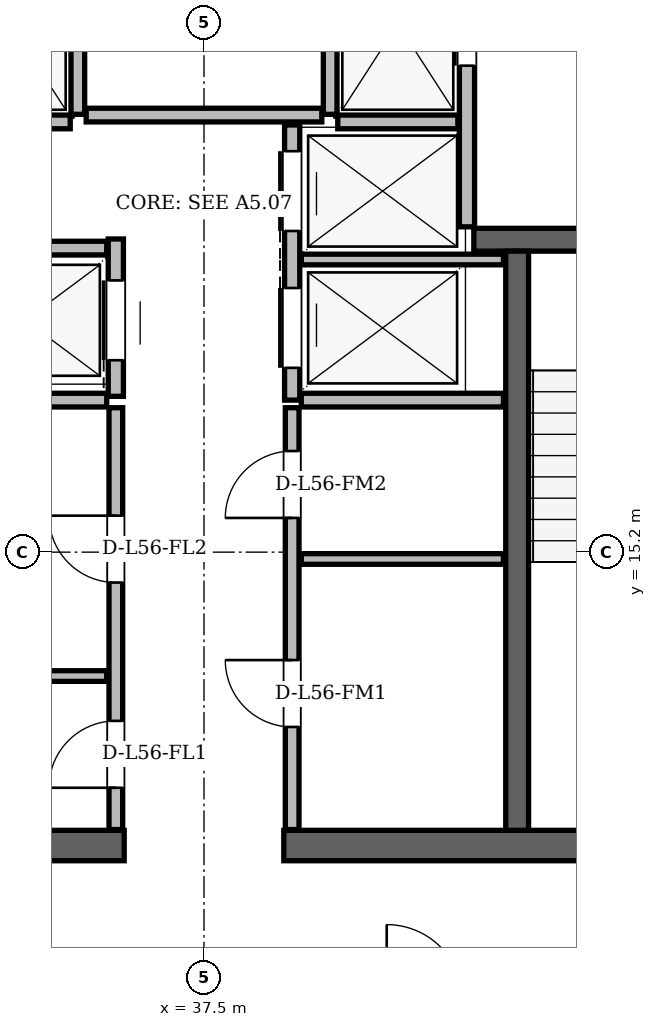
"""IFC4 building model, lengths in metres.
Left out: names, types, materials, properties, quantities, classifications, styles, units other than length and angle.
Written with IfcOpenShell. Run it as: python <this file> out.ifc"""

import sys

from ifc_helpers import new_model, si_unit, direction, frame, frame_2d, origin, place, context, subcontext, project, spatial, rectangle, extrude, element, fill, save


model = new_model("IFC4")
c1 = context("Model", 3, precision=1e-05, world=origin(), true_north=direction((0.0, 1.0)))
c2 = subcontext(c1, "Body", "Model", "MODEL_VIEW")
j1 = project(units=[si_unit("LENGTHUNIT", "METRE"), si_unit("PLANEANGLEUNIT", "RADIAN")], contexts=[c1])
p1 = place(None, origin())
s1 = spatial("IfcSite", under=j1, at=p1, CompositionType="ELEMENT")
p2 = place(p1, origin())
s2 = spatial("IfcBuilding", under=s1, at=p2, CompositionType="ELEMENT")
p3 = place(p2, frame((0.0, 0.0, 212.7)))
s3 = spatial("IfcBuildingStorey", under=s2, at=p3, CompositionType="ELEMENT", Elevation=212.7)
for number, where, z_axis, x_axis in (
    (1, (29.35, 11.34, 0.0), (0.0, 0.0, 1.0), (1.0, 0.0, 0.0)),
    (2, (38.55, 11.34, 0.0), (0.0, 0.0, 1.0), (1.0, 0.0, 0.0)),
):
    element("IfcWall", number, at=place(p3, frame(where, z_axis=z_axis, x_axis=x_axis)), inside=s3, PredefinedType="SHEAR", context=c2, shape_type="SweptSolid", body=[
        extrude(rectangle(XDim=7.1, YDim=0.4, at=frame_2d((3.55, 0.0))), origin(), (0.0, 0.0, 1.0), 3.38),
    ])
p4 = place(p3, frame((41.05, 19.31, 0.0), z_axis=(0.0, 0.0, 1.0), x_axis=(1.0, 0.0, 0.0)))
e3 = element("IfcWall", 3, at=p4, inside=s3, PredefinedType="SHEAR", context=c2, shape_type="SweptSolid", body=[
    extrude(rectangle(XDim=4.01, YDim=0.3, at=frame_2d((2.005, 0.0))), origin(), (0.0, 0.0, 1.0), 3.38),
])
p5 = place(p4, frame((1.6, 0.0, 0.0)))
e4 = element("IfcOpeningElement", 4, at=p5, cuts=e3, PredefinedType="OPENING", context=c2, shape_type="SweptSolid", body=[
    extrude(rectangle(XDim=1.4, YDim=2.2, at=frame_2d((0.7, 1.1))), frame((0.0, 0.15, 0.0), z_axis=(0.0, -1.0, 0.0), x_axis=(1.0, 0.0, 0.0)), (0.0, 0.0, 1.0), 0.3),
])
p6 = place(p3, frame((41.62, 11.54, 0.0), z_axis=(0.0, 0.0, 1.0), x_axis=(0.0, 1.0, 0.0)))
e5 = element("IfcWall", 5, at=p6, inside=s3, PredefinedType="SHEAR", context=c2, shape_type="SweptSolid", body=[
    extrude(rectangle(XDim=7.62, YDim=0.3, at=frame_2d((3.81, 0.0))), origin(), (0.0, 0.0, 1.0), 3.38),
])
p7 = place(p3, frame((59.201, 11.543, 0.0), z_axis=(0.0, 0.0, 1.0), x_axis=(-0.499999040053, 0.866025958009, 0.0)))
e6 = element("IfcWall", 6, at=p7, inside=s3, PredefinedType="SOLIDWALL", context=c2, shape_type="SweptSolid", body=[
    extrude(rectangle(XDim=36.523, YDim=0.29, at=frame_2d((18.261, 0.0))), origin(), (0.0, 0.0, 1.0), 2.677),
])
p8 = place(p7, frame((8.034, 0.0, 0.0)))
e7 = element("IfcOpeningElement", 7, at=p8, cuts=e6, PredefinedType="OPENING", context=c2, shape_type="SweptSolid", body=[
    extrude(rectangle(XDim=1.5, YDim=2.2, at=frame_2d((0.75, 1.1))), frame((0.0, 0.145, 0.0), z_axis=(0.0, -1.0, 0.0), x_axis=(1.0, 0.0, 0.0)), (0.0, 0.0, 1.0), 0.29),
])
p9 = place(p7, frame((31.594, 0.0, 0.0)))
e8 = element("IfcOpeningElement", 8, at=p9, cuts=e6, PredefinedType="OPENING", context=c2, shape_type="SweptSolid", body=[
    extrude(rectangle(XDim=1.5, YDim=2.2, at=frame_2d((0.75, 1.1))), frame((0.0, 0.145, 0.0), z_axis=(0.0, -1.0, 0.0), x_axis=(1.0, 0.0, 0.0)), (0.0, 0.0, 1.0), 0.29),
])
p10 = place(p7, frame((12.291, 0.0, 0.85)))
e9 = element("IfcOpeningElement", 9, at=p10, cuts=e6, PredefinedType="OPENING", context=c2, shape_type="SweptSolid", body=[
    extrude(rectangle(XDim=1.4, YDim=1.6, at=frame_2d((0.7, 0.8))), frame((0.0, 0.145, 0.0), z_axis=(0.0, -1.0, 0.0), x_axis=(1.0, 0.0, 0.0)), (0.0, 0.0, 1.0), 0.29),
])
p11 = place(p7, frame((2.252, 0.0, 0.85)))
e10 = element("IfcOpeningElement", 10, at=p11, cuts=e6, PredefinedType="OPENING", context=c2, shape_type="SweptSolid", body=[
    extrude(rectangle(XDim=1.2, YDim=1.48, at=frame_2d((0.6, 0.74))), frame((0.0, 0.145, 0.0), z_axis=(0.0, -1.0, 0.0), x_axis=(1.0, 0.0, 0.0)), (0.0, 0.0, 1.0), 0.29),
])
p12 = place(p7, frame((16.093, 0.0, 0.85)))
e11 = element("IfcOpeningElement", 11, at=p12, cuts=e6, PredefinedType="OPENING", context=c2, shape_type="SweptSolid", body=[
    extrude(rectangle(XDim=3.0, YDim=1.717, at=frame_2d((1.5, 0.858))), frame((0.0, 0.145, 0.0), z_axis=(0.0, -1.0, 0.0), x_axis=(1.0, 0.0, 0.0)), (0.0, 0.0, 1.0), 0.29),
])
p13 = place(p7, frame((23.458, 0.0, 0.85)))
e12 = element("IfcOpeningElement", 12, at=p13, cuts=e6, PredefinedType="OPENING", context=c2, shape_type="SweptSolid", body=[
    extrude(rectangle(XDim=1.2, YDim=1.48, at=frame_2d((0.6, 0.74))), frame((0.0, 0.145, 0.0), z_axis=(0.0, -1.0, 0.0), x_axis=(1.0, 0.0, 0.0)), (0.0, 0.0, 1.0), 0.29),
])
p14 = place(p7, frame((34.061, 0.0, 0.85)))
e13 = element("IfcOpeningElement", 13, at=p14, cuts=e6, PredefinedType="OPENING", context=c2, shape_type="SweptSolid", body=[
    extrude(rectangle(XDim=1.2, YDim=1.48, at=frame_2d((0.6, 0.74))), frame((0.0, 0.145, 0.0), z_axis=(0.0, -1.0, 0.0), x_axis=(1.0, 0.0, 0.0)), (0.0, 0.0, 1.0), 0.29),
])
p15 = place(p3, frame((35.84, 20.96, 0.0), z_axis=(0.0, 0.0, 1.0), x_axis=(0.0, 1.0, 0.0)))
e14 = element("IfcWall", 14, at=p15, inside=s3, PredefinedType="PARTITIONING", context=c2, shape_type="SweptSolid", body=[
    extrude(rectangle(XDim=3.02, YDim=0.18, at=frame_2d((1.51, 0.0))), origin(), (0.0, 0.0, 1.0), 3.38),
])
p16 = place(p3, frame((34.16, 20.86, 0.0), z_axis=(0.0, 0.0, 1.0), x_axis=(1.0, 0.0, 0.0)))
e15 = element("IfcWall", 15, at=p16, inside=s3, PredefinedType="PARTITIONING", context=c2, shape_type="SweptSolid", body=[
    extrude(rectangle(XDim=1.58, YDim=0.18, at=frame_2d((0.79, 0.0))), origin(), (0.0, 0.0, 1.0), 3.38),
])
p17 = place(p3, frame((40.96, 19.48, 0.0), z_axis=(0.0, 0.0, 1.0), x_axis=(0.0, 1.0, 0.0)))
e16 = element("IfcWall", 16, at=p17, inside=s3, PredefinedType="PARTITIONING", context=c2, shape_type="SweptSolid", body=[
    extrude(rectangle(XDim=4.5, YDim=0.2, at=frame_2d((2.25, 0.0))), origin(), (0.0, 0.0, 1.0), 3.38),
])
p18 = place(p17, frame((2.12, 0.0, 0.0)))
e17 = element("IfcOpeningElement", 17, at=p18, cuts=e16, PredefinedType="OPENING", context=c2, shape_type="SweptSolid", body=[
    extrude(rectangle(XDim=1.1, YDim=2.2, at=frame_2d((0.55, 1.1))), frame((0.0, 0.1, 0.0), z_axis=(0.0, -1.0, 0.0), x_axis=(1.0, 0.0, 0.0)), (0.0, 0.0, 1.0), 0.2),
])
p19 = place(p3, frame((39.16, 20.96, 0.0), z_axis=(0.0, 0.0, 1.0), x_axis=(0.0, 1.0, 0.0)))
e18 = element("IfcWall", 18, at=p19, inside=s3, PredefinedType="PARTITIONING", context=c2, shape_type="SweptSolid", body=[
    extrude(rectangle(XDim=3.02, YDim=0.18, at=frame_2d((1.51, 0.0))), origin(), (0.0, 0.0, 1.0), 3.38),
])
p20 = place(p3, frame((39.26, 20.86, 0.0), z_axis=(0.0, 0.0, 1.0), x_axis=(1.0, 0.0, 0.0)))
e19 = element("IfcWall", 19, at=p20, inside=s3, PredefinedType="PARTITIONING", context=c2, shape_type="SweptSolid", body=[
    extrude(rectangle(XDim=1.58, YDim=0.18, at=frame_2d((0.79, 0.0))), origin(), (0.0, 0.0, 1.0), 3.38),
])
p21 = place(p3, frame((36.34, 17.25, 0.0), z_axis=(0.0, 0.0, 1.0), x_axis=(0.0, 1.0, 0.0)))
e20 = element("IfcWall", 20, at=p21, inside=s3, PredefinedType="PARTITIONING", context=c2, shape_type="SweptSolid", body=[
    extrude(rectangle(XDim=2.07, YDim=0.2, at=frame_2d((1.035, 0.0))), origin(), (0.0, 0.0, 1.0), 3.38),
])
p22 = place(p21, frame((0.475, 0.0, 0.0)))
e21 = element("IfcOpeningElement", 21, at=p22, cuts=e20, PredefinedType="OPENING", context=c2, shape_type="SweptSolid", body=[
    extrude(rectangle(XDim=1.05, YDim=2.15, at=frame_2d((0.525, 1.075))), frame((0.0, 0.1, 0.0), z_axis=(0.0, -1.0, 0.0), x_axis=(1.0, 0.0, 0.0)), (0.0, 0.0, 1.0), 0.2),
])
p23 = place(p3, frame((33.95, 19.2, 0.0), z_axis=(0.0, 0.0, 1.0), x_axis=(1.0, 0.0, 0.0)))
e22 = element("IfcWall", 22, at=p23, inside=s3, PredefinedType="PARTITIONING", context=c2, shape_type="SweptSolid", body=[
    extrude(rectangle(XDim=2.27, YDim=0.18, at=frame_2d((1.135, 0.0))), origin(), (0.0, 0.0, 1.0), 3.38),
])
p24 = place(p3, frame((33.56, 17.2, 0.0), z_axis=(0.0, 0.0, 1.0), x_axis=(1.0, 0.0, 0.0)))
e23 = element("IfcWall", 23, at=p24, inside=s3, PredefinedType="PARTITIONING", context=c2, shape_type="SweptSolid", body=[
    extrude(rectangle(XDim=2.66, YDim=0.18, at=frame_2d((1.33, 0.0))), origin(), (0.0, 0.0, 1.0), 3.38),
])
p25 = place(p3, frame((36.34, 11.55, 0.0), z_axis=(0.0, 0.0, 1.0), x_axis=(0.0, 1.0, 0.0)))
e24 = element("IfcWall", 24, at=p25, inside=s3, PredefinedType="PARTITIONING", context=c2, shape_type="SweptSolid", body=[
    extrude(rectangle(XDim=5.55, YDim=0.18, at=frame_2d((2.775, 0.0))), origin(), (0.0, 0.0, 1.0), 3.38),
])
p26 = place(p25, frame((0.55, 0.0, 0.0)))
e25 = element("IfcOpeningElement", 25, at=p26, cuts=e24, PredefinedType="OPENING", context=c2, shape_type="SweptSolid", body=[
    extrude(rectangle(XDim=0.88, YDim=2.08, at=frame_2d((0.44, 1.04))), frame((0.0, 0.09, 0.0), z_axis=(0.0, -1.0, 0.0), x_axis=(1.0, 0.0, 0.0)), (0.0, 0.0, 1.0), 0.18),
])
p27 = place(p25, frame((3.25, 0.0, 0.0)))
e26 = element("IfcOpeningElement", 26, at=p27, cuts=e24, PredefinedType="OPENING", context=c2, shape_type="SweptSolid", body=[
    extrude(rectangle(XDim=0.88, YDim=2.08, at=frame_2d((0.44, 1.04))), frame((0.0, 0.09, 0.0), z_axis=(0.0, -1.0, 0.0), x_axis=(1.0, 0.0, 0.0)), (0.0, 0.0, 1.0), 0.18),
])
p28 = place(p3, frame((33.56, 13.57, 0.0), z_axis=(0.0, 0.0, 1.0), x_axis=(1.0, 0.0, 0.0)))
e27 = element("IfcWall", 27, at=p28, inside=s3, PredefinedType="PARTITIONING", context=c2, shape_type="SweptSolid", body=[
    extrude(rectangle(XDim=2.66, YDim=0.14, at=frame_2d((1.33, 0.0))), origin(), (0.0, 0.0, 1.0), 3.38),
])
p29 = place(p3, frame((38.66, 17.2, 0.0), z_axis=(0.0, 0.0, 1.0), x_axis=(0.0, 1.0, 0.0)))
e28 = element("IfcWall", 28, at=p29, inside=s3, PredefinedType="PARTITIONING", context=c2, shape_type="SweptSolid", body=[
    extrude(rectangle(XDim=3.62, YDim=0.2, at=frame_2d((1.81, 0.0))), origin(), (0.0, 0.0, 1.0), 3.38),
])
p30 = place(p29, frame((0.425, 0.0, 0.0)))
e29 = element("IfcOpeningElement", 29, at=p30, cuts=e28, PredefinedType="OPENING", context=c2, shape_type="SweptSolid", body=[
    extrude(rectangle(XDim=1.05, YDim=2.15, at=frame_2d((0.525, 1.075))), frame((0.0, 0.1, 0.0), z_axis=(0.0, -1.0, 0.0), x_axis=(1.0, 0.0, 0.0)), (0.0, 0.0, 1.0), 0.2),
])
p31 = place(p29, frame((2.225, 0.0, 0.0)))
e30 = element("IfcOpeningElement", 30, at=p31, cuts=e28, PredefinedType="OPENING", context=c2, shape_type="SweptSolid", body=[
    extrude(rectangle(XDim=1.05, YDim=2.15, at=frame_2d((0.525, 1.075))), frame((0.0, 0.1, 0.0), z_axis=(0.0, -1.0, 0.0), x_axis=(1.0, 0.0, 0.0)), (0.0, 0.0, 1.0), 0.2),
])
p32 = place(p3, frame((38.78, 17.2, 0.0), z_axis=(0.0, 0.0, 1.0), x_axis=(1.0, 0.0, 0.0)))
e31 = element("IfcWall", 31, at=p32, inside=s3, PredefinedType="PARTITIONING", context=c2, shape_type="SweptSolid", body=[
    extrude(rectangle(XDim=2.66, YDim=0.18, at=frame_2d((1.33, 0.0))), origin(), (0.0, 0.0, 1.0), 3.38),
])
p33 = place(p3, frame((38.78, 19.05, 0.0), z_axis=(0.0, 0.0, 1.0), x_axis=(1.0, 0.0, 0.0)))
e32 = element("IfcWall", 32, at=p33, inside=s3, PredefinedType="PARTITIONING", context=c2, shape_type="SweptSolid", body=[
    extrude(rectangle(XDim=2.66, YDim=0.14, at=frame_2d((1.33, 0.0))), origin(), (0.0, 0.0, 1.0), 3.38),
])
p34 = place(p3, frame((38.66, 11.55, 0.0), z_axis=(0.0, 0.0, 1.0), x_axis=(0.0, 1.0, 0.0)))
e33 = element("IfcWall", 33, at=p34, inside=s3, PredefinedType="PARTITIONING", context=c2, shape_type="SweptSolid", body=[
    extrude(rectangle(XDim=5.55, YDim=0.18, at=frame_2d((2.775, 0.0))), origin(), (0.0, 0.0, 1.0), 3.38),
])
p35 = place(p34, frame((1.35, 0.0, 0.0)))
e34 = element("IfcOpeningElement", 34, at=p35, cuts=e33, PredefinedType="OPENING", context=c2, shape_type="SweptSolid", body=[
    extrude(rectangle(XDim=0.88, YDim=2.08, at=frame_2d((0.44, 1.04))), frame((0.0, 0.09, 0.0), z_axis=(0.0, -1.0, 0.0), x_axis=(1.0, 0.0, 0.0)), (0.0, 0.0, 1.0), 0.18),
])
p36 = place(p34, frame((4.1, 0.0, 0.0)))
e35 = element("IfcOpeningElement", 35, at=p36, cuts=e33, PredefinedType="OPENING", context=c2, shape_type="SweptSolid", body=[
    extrude(rectangle(XDim=0.88, YDim=2.08, at=frame_2d((0.44, 1.04))), frame((0.0, 0.09, 0.0), z_axis=(0.0, -1.0, 0.0), x_axis=(1.0, 0.0, 0.0)), (0.0, 0.0, 1.0), 0.18),
])
p37 = place(p3, frame((38.78, 15.11, 0.0), z_axis=(0.0, 0.0, 1.0), x_axis=(1.0, 0.0, 0.0)))
e36 = element("IfcWall", 36, at=p37, inside=s3, PredefinedType="PARTITIONING", context=c2, shape_type="SweptSolid", body=[
    extrude(rectangle(XDim=2.66, YDim=0.14, at=frame_2d((1.33, 0.0))), origin(), (0.0, 0.0, 1.0), 3.38),
])
p38 = place(p3, frame((35.95, 20.95, 0.0), z_axis=(0.0, 0.0, 1.0), x_axis=(1.0, 0.0, 0.0)))
e37 = element("IfcWall", 37, at=p38, inside=s3, PredefinedType="PARTITIONING", context=c2, shape_type="SweptSolid", body=[
    extrude(rectangle(XDim=3.1, YDim=0.18, at=frame_2d((1.55, 0.0))), origin(), (0.0, 0.0, 1.0), 3.38),
])
p39 = place(p26, origin())
e38 = element("IfcDoor", 38, at=p39, inside=s3, OperationType="SINGLE_SWING_LEFT", PredefinedType="DOOR", context=c2, shape_type="SweptSolid", body=[
    extrude(rectangle(XDim=0.88, YDim=2.08, at=frame_2d((0.44, 1.04))), frame((0.0, 0.025, 0.0), z_axis=(0.0, -1.0, 0.0), x_axis=(1.0, 0.0, 0.0)), (0.0, 0.0, 1.0), 0.05),
])
fill(e25, e38)
p40 = place(p27, origin())
e39 = element("IfcDoor", 39, at=p40, inside=s3, OperationType="SINGLE_SWING_RIGHT", PredefinedType="DOOR", context=c2, shape_type="SweptSolid", body=[
    extrude(rectangle(XDim=0.88, YDim=2.08, at=frame_2d((0.44, 1.04))), frame((0.0, 0.025, 0.0), z_axis=(0.0, -1.0, 0.0), x_axis=(1.0, 0.0, 0.0)), (0.0, 0.0, 1.0), 0.05),
])
fill(e26, e39)
p41 = place(p35, origin())
e40 = element("IfcDoor", 40, at=p41, inside=s3, OperationType="SINGLE_SWING_RIGHT", PredefinedType="DOOR", context=c2, shape_type="SweptSolid", body=[
    extrude(rectangle(XDim=0.88, YDim=2.08, at=frame_2d((0.44, 1.04))), frame((0.0, 0.025, 0.0), z_axis=(0.0, -1.0, 0.0), x_axis=(1.0, 0.0, 0.0)), (0.0, 0.0, 1.0), 0.05),
])
fill(e34, e40)
p42 = place(p36, origin())
e41 = element("IfcDoor", 41, at=p42, inside=s3, OperationType="SINGLE_SWING_LEFT", PredefinedType="DOOR", context=c2, shape_type="SweptSolid", body=[
    extrude(rectangle(XDim=0.88, YDim=2.08, at=frame_2d((0.44, 1.04))), frame((0.0, 0.025, 0.0), z_axis=(0.0, -1.0, 0.0), x_axis=(1.0, 0.0, 0.0)), (0.0, 0.0, 1.0), 0.05),
])
fill(e35, e41)
p43 = place(p18, origin())
e42 = element("IfcDoor", 42, at=p43, inside=s3, OperationType="SLIDING_TO_RIGHT", PredefinedType="DOOR", context=c2, shape_type="SweptSolid", body=[
    extrude(rectangle(XDim=1.1, YDim=2.2, at=frame_2d((0.55, 1.1))), frame((0.0, 0.025, 0.0), z_axis=(0.0, -1.0, 0.0), x_axis=(1.0, 0.0, 0.0)), (0.0, 0.0, 1.0), 0.05),
])
fill(e17, e42)
p44 = place(p22, origin())
e43 = element("IfcDoor", 43, at=p44, inside=s3, OperationType="SLIDING_TO_LEFT", PredefinedType="DOOR", context=c2, shape_type="SweptSolid", body=[
    extrude(rectangle(XDim=1.05, YDim=2.15, at=frame_2d((0.525, 1.075))), frame((0.0, 0.025, 0.0), z_axis=(0.0, -1.0, 0.0), x_axis=(1.0, 0.0, 0.0)), (0.0, 0.0, 1.0), 0.05),
])
fill(e21, e43)
p45 = place(p30, origin())
e44 = element("IfcDoor", 44, at=p45, inside=s3, OperationType="SLIDING_TO_RIGHT", PredefinedType="DOOR", context=c2, shape_type="SweptSolid", body=[
    extrude(rectangle(XDim=1.05, YDim=2.15, at=frame_2d((0.525, 1.075))), frame((0.0, 0.025, 0.0), z_axis=(0.0, -1.0, 0.0), x_axis=(1.0, 0.0, 0.0)), (0.0, 0.0, 1.0), 0.05),
])
fill(e29, e44)
p46 = place(p31, origin())
e45 = element("IfcDoor", 45, at=p46, inside=s3, OperationType="SLIDING_TO_LEFT", PredefinedType="DOOR", context=c2, shape_type="SweptSolid", body=[
    extrude(rectangle(XDim=1.05, YDim=2.15, at=frame_2d((0.525, 1.075))), frame((0.0, 0.025, 0.0), z_axis=(0.0, -1.0, 0.0), x_axis=(1.0, 0.0, 0.0)), (0.0, 0.0, 1.0), 0.05),
])
fill(e30, e45)
save(model, sys.argv[1])
